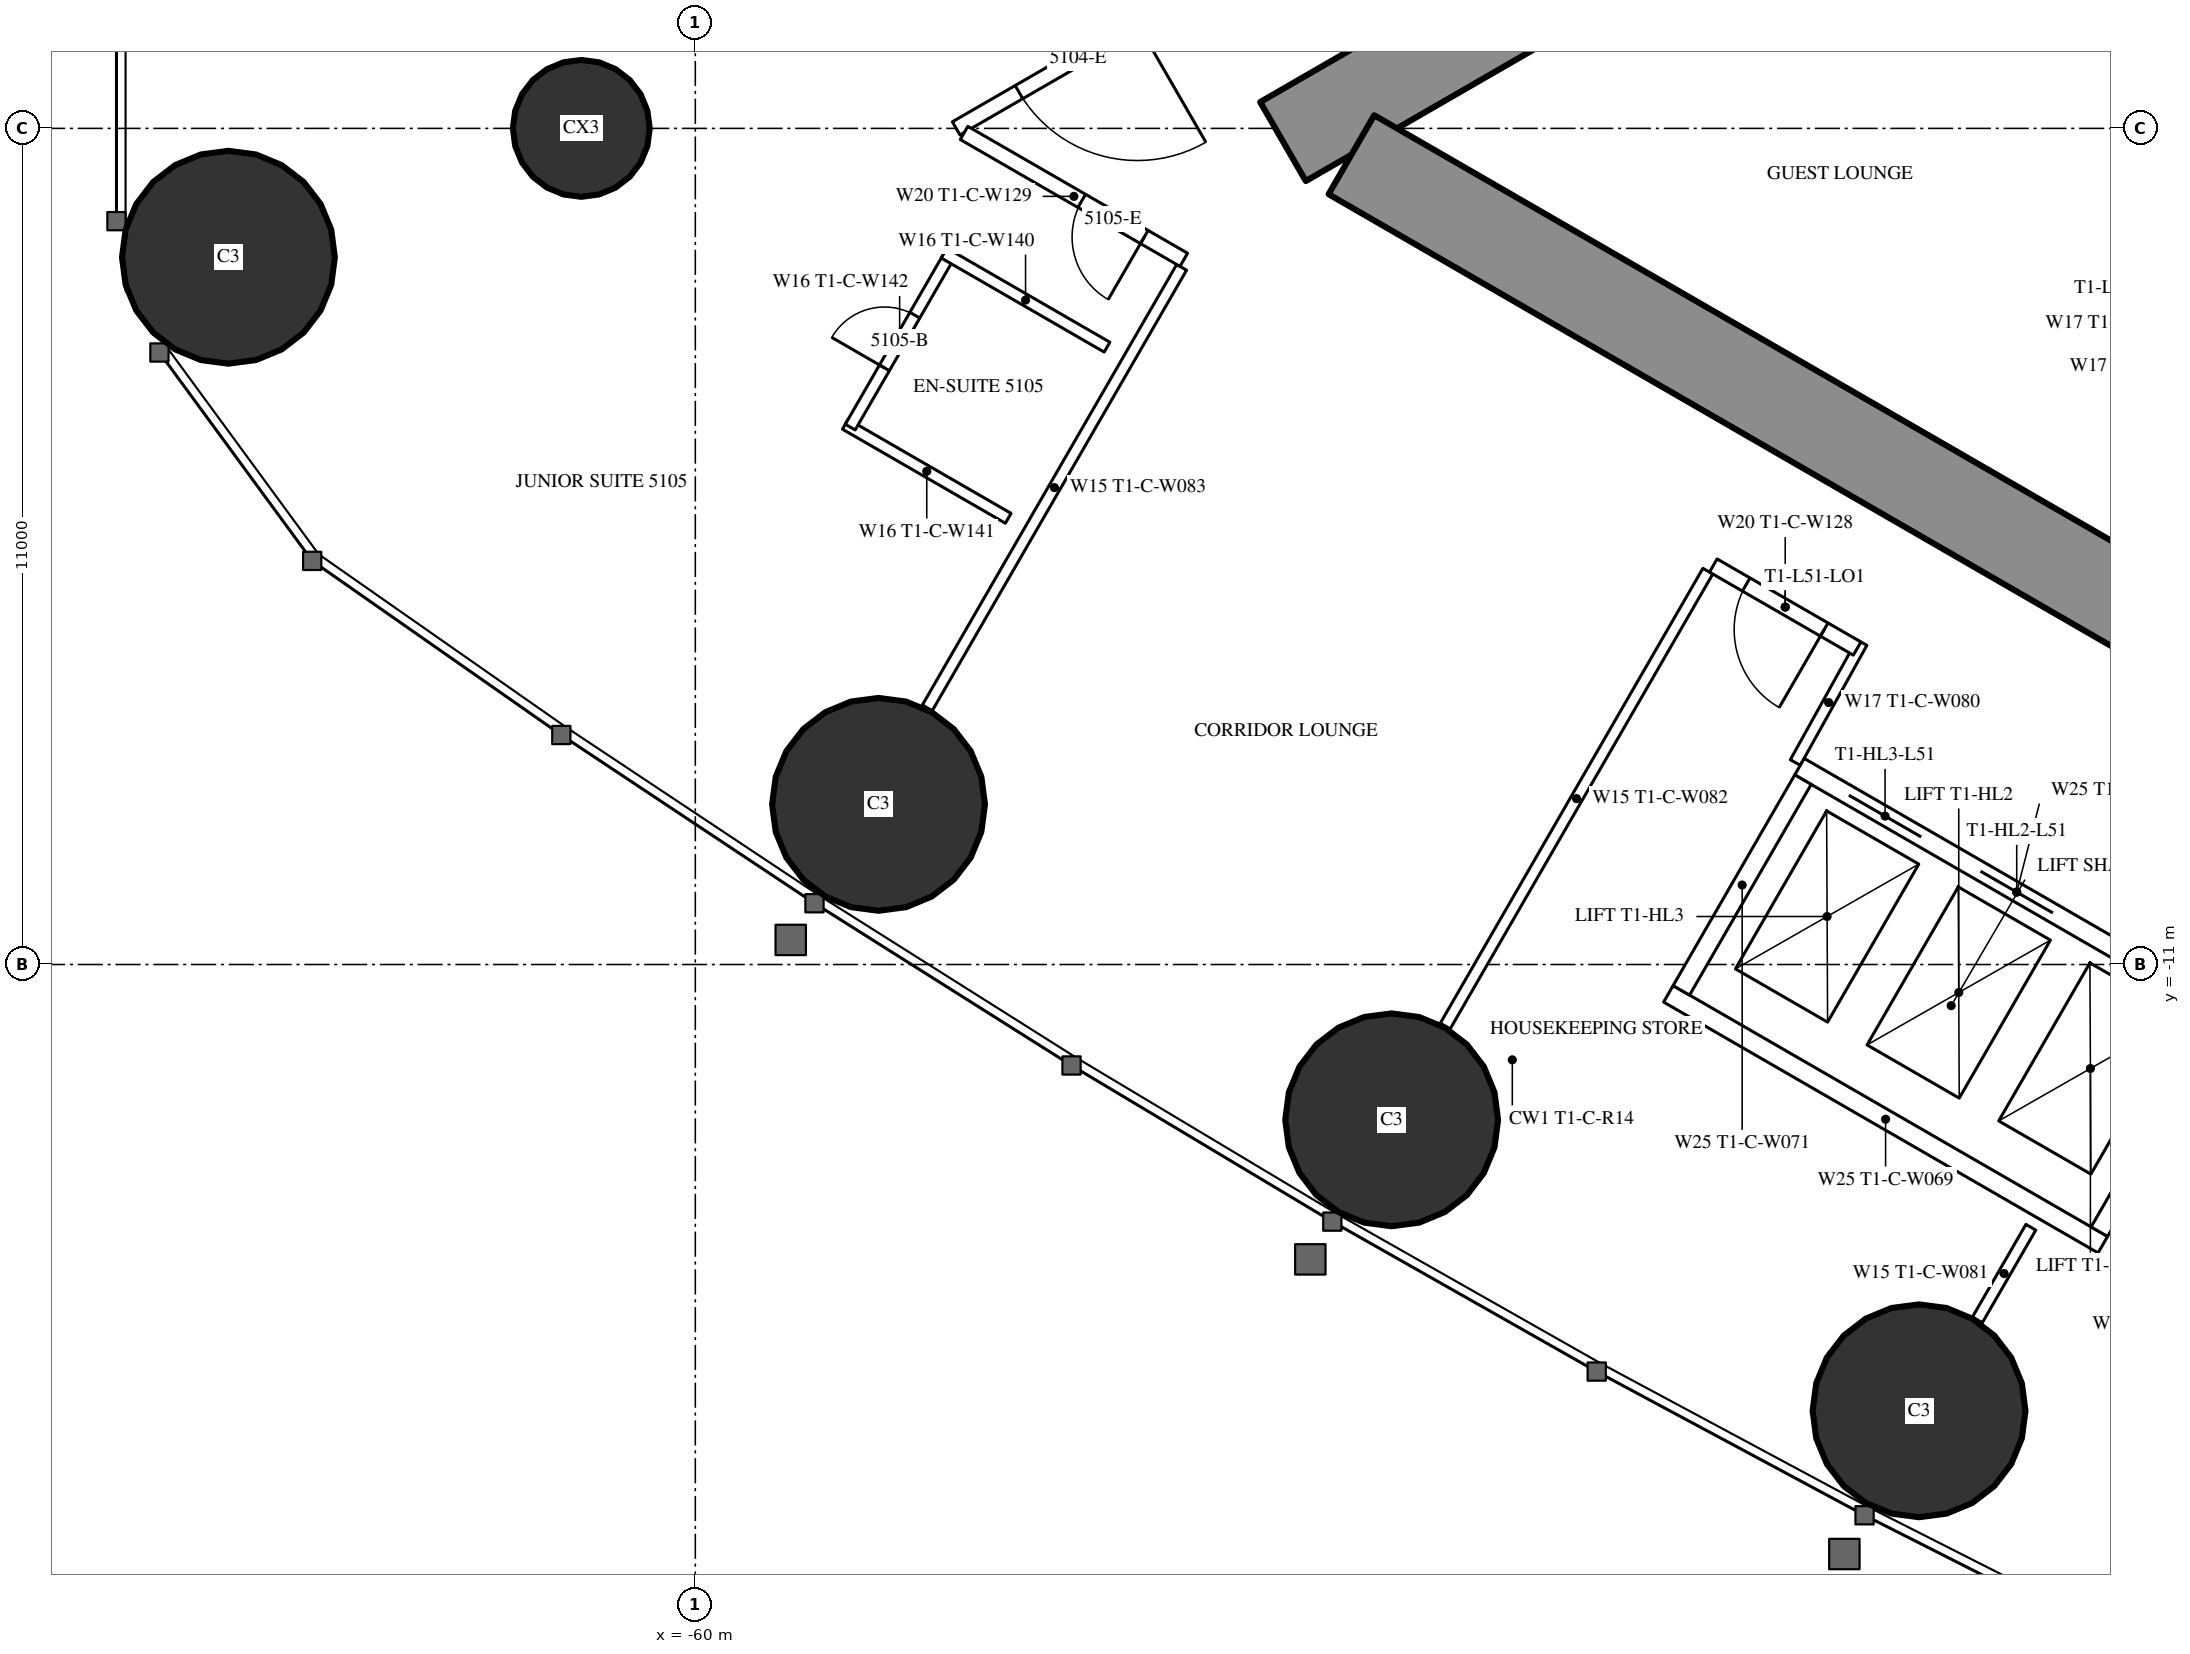
"""IFC4 building model, lengths in metres.
Left out: names, types, materials, properties, quantities, classifications, styles, units other than length and angle.
Written with IfcOpenShell. Run it as: python <this file> out.ifc"""

import sys

from ifc_helpers import new_model, si_unit, direction, frame, frame_2d, origin, origin_2d, place, context, subcontext, project, spatial, rectangle, circle, extrude, element, fill, save


model = new_model("IFC4")
c1 = context("Model", 3, precision=1e-05, world=origin(), true_north=direction((0.0, 1.0)))
c2 = subcontext(c1, "Body", "Model", "MODEL_VIEW")
j1 = project(units=[si_unit("LENGTHUNIT", "METRE"), si_unit("PLANEANGLEUNIT", "RADIAN")], contexts=[c1])
p1 = place(None, origin())
s1 = spatial("IfcSite", under=j1, at=p1, CompositionType="ELEMENT")
p2 = place(p1, origin())
s2 = spatial("IfcBuilding", under=s1, at=p2, CompositionType="ELEMENT")
p3 = place(p2, frame((0.0, 0.0, 191.3)))
s3 = spatial("IfcBuildingStorey", under=s2, at=p3, CompositionType="ELEMENT", Elevation=191.3)
for number, where, z_axis, x_axis in (
    (1, (-66.143, -1.695, 0.0), (0.0, 0.0, 1.0), (1.0, 0.0, 0.0)),
    (2, (-57.59, -8.893, 0.0), (0.0, 0.0, 1.0), (1.0, 0.0, 0.0)),
    (3, (-50.839, -13.043, 0.0), (0.0, 0.0, 1.0), (1.0, 0.0, 0.0)),
    (4, (-43.9, -16.871, 0.0), (0.0, 0.0, 1.0), (1.0, 0.0, 0.0)),
):
    element("IfcColumn", number, at=place(p3, frame(where, z_axis=z_axis, x_axis=x_axis)), inside=s3, PredefinedType="COLUMN", context=c2, shape_type="SweptSolid", body=[
        extrude(circle(Radius=1.4, at=origin_2d()), origin(), (0.0, 0.0, 1.0), 3.5),
    ])
p4 = place(p3, frame((-61.5, 0.0, 0.0), z_axis=(0.0, 0.0, 1.0), x_axis=(1.0, 0.0, 0.0)))
e5 = element("IfcColumn", 5, at=p4, inside=s3, PredefinedType="COLUMN", context=c2, shape_type="SweptSolid", body=[
    extrude(circle(Radius=0.9, at=origin_2d()), origin(), (0.0, 0.0, 1.0), 3.5),
])
p5 = place(p3, frame((-27.2, 14.3, 0.0), z_axis=(0.0, 0.0, 1.0), x_axis=(-0.866026593062, -0.499997940104, 0.0)))
e6 = element("IfcWall", 6, at=p5, inside=s3, PredefinedType="SHEAR", context=c2, shape_type="SweptSolid", body=[
    extrude(rectangle(XDim=28.946, YDim=1.2, at=frame_2d((14.473, 0.0))), origin(), (0.0, 0.0, 1.0), 3.5),
])
p6 = place(p5, frame((4.6, 0.0, 0.0)))
e7 = element("IfcOpeningElement", 7, at=p6, cuts=e6, PredefinedType="OPENING", context=c2, shape_type="SweptSolid", body=[
    extrude(rectangle(XDim=1.0, YDim=2.2, at=frame_2d((0.5, 1.1))), frame((0.0, 0.61, 0.0), z_axis=(0.0, -1.0, 0.0), x_axis=(1.0, 0.0, 0.0)), (0.0, 0.0, 1.0), 1.22),
])
p7 = place(p5, frame((13.395, 0.0, 0.0)))
e8 = element("IfcOpeningElement", 8, at=p7, cuts=e6, PredefinedType="OPENING", context=c2, shape_type="SweptSolid", body=[
    extrude(rectangle(XDim=1.8, YDim=2.2, at=frame_2d((0.9, 1.1))), frame((0.0, 0.61, 0.0), z_axis=(0.0, -1.0, 0.0), x_axis=(1.0, 0.0, 0.0)), (0.0, 0.0, 1.0), 1.22),
])
p8 = place(p3, frame((-27.2, -14.3, 0.0), z_axis=(0.0, 0.0, 1.0), x_axis=(-0.866024021859, 0.500002393557, 0.0)))
e9 = element("IfcWall", 9, at=p8, inside=s3, PredefinedType="SHEAR", context=c2, shape_type="SweptSolid", body=[
    extrude(rectangle(XDim=27.907, YDim=1.2, at=frame_2d((13.954, 0.0))), origin(), (0.0, 0.0, 1.0), 3.5),
])
p9 = place(p8, frame((4.6, 0.0, 0.0)))
e10 = element("IfcOpeningElement", 10, at=p9, cuts=e9, PredefinedType="OPENING", context=c2, shape_type="SweptSolid", body=[
    extrude(rectangle(XDim=1.0, YDim=2.2, at=frame_2d((0.5, 1.1))), frame((0.0, 0.61, 0.0), z_axis=(0.0, -1.0, 0.0), x_axis=(1.0, 0.0, 0.0)), (0.0, 0.0, 1.0), 1.22),
])
p10 = place(p8, frame((13.395, 0.0, 0.0)))
e11 = element("IfcOpeningElement", 11, at=p10, cuts=e9, PredefinedType="OPENING", context=c2, shape_type="SweptSolid", body=[
    extrude(rectangle(XDim=1.8, YDim=2.2, at=frame_2d((0.9, 1.1))), frame((0.0, 0.61, 0.0), z_axis=(0.0, -1.0, 0.0), x_axis=(1.0, 0.0, 0.0)), (0.0, 0.0, 1.0), 1.22),
])
p11 = place(p3, frame((-27.86, 16.575, 0.0), z_axis=(0.0, 0.0, 1.0), x_axis=(-0.866025533911, -0.499999774615, 0.0)))
e12 = element("IfcWall", 12, at=p11, inside=s3, PredefinedType="PARTITIONING", context=c2, shape_type="SweptSolid", body=[
    extrude(rectangle(XDim=33.149, YDim=0.2, at=frame_2d((16.575, 0.0))), origin(), (0.0, 0.0, 1.0), 3.25),
])
p12 = place(p11, frame((3.75, 0.0, 0.0)))
e13 = element("IfcOpeningElement", 13, at=p12, cuts=e12, PredefinedType="OPENING", context=c2, shape_type="SweptSolid", body=[
    extrude(rectangle(XDim=1.0, YDim=2.2, at=frame_2d((0.5, 1.1))), frame((0.0, 0.11, 0.0), z_axis=(0.0, -1.0, 0.0), x_axis=(1.0, 0.0, 0.0)), (0.0, 0.0, 1.0), 0.22),
])
p13 = place(p11, frame((16.402, 0.0, 0.0)))
e14 = element("IfcOpeningElement", 14, at=p13, cuts=e12, PredefinedType="OPENING", context=c2, shape_type="SweptSolid", body=[
    extrude(rectangle(XDim=0.95, YDim=2.2, at=frame_2d((0.475, 1.1))), frame((0.0, 0.11, 0.0), z_axis=(0.0, -1.0, 0.0), x_axis=(1.0, 0.0, 0.0)), (0.0, 0.0, 1.0), 0.22),
])
p14 = place(p11, frame((22.047, 0.0, 0.0)))
e15 = element("IfcOpeningElement", 15, at=p14, cuts=e12, PredefinedType="OPENING", context=c2, shape_type="SweptSolid", body=[
    extrude(rectangle(XDim=0.95, YDim=2.2, at=frame_2d((0.475, 1.1))), frame((0.0, 0.11, 0.0), z_axis=(0.0, -1.0, 0.0), x_axis=(1.0, 0.0, 0.0)), (0.0, 0.0, 1.0), 0.22),
])
p15 = place(p11, frame((30.396, 0.0, 0.0)))
e16 = element("IfcOpeningElement", 16, at=p15, cuts=e12, PredefinedType="OPENING", context=c2, shape_type="SweptSolid", body=[
    extrude(rectangle(XDim=1.8, YDim=2.2, at=frame_2d((0.9, 1.1))), frame((0.0, 0.11, 0.0), z_axis=(0.0, -1.0, 0.0), x_axis=(1.0, 0.0, 0.0)), (0.0, 0.0, 1.0), 0.22),
])
p16 = place(p3, frame((-46.679, -5.825, 0.0), z_axis=(0.0, 0.0, 1.0), x_axis=(-0.500006839597, -0.866021454905, 0.0)))
e17 = element("IfcWall", 17, at=p16, inside=s3, PredefinedType="PARTITIONING", context=c2, shape_type="SweptSolid", body=[
    extrude(rectangle(XDim=6.911, YDim=0.15, at=frame_2d((3.456, 0.0))), origin(), (0.0, 0.0, 1.0), 2.3),
])
p17 = place(p3, frame((-53.602, -1.828, 0.0), z_axis=(0.0, 0.0, 1.0), x_axis=(-0.49999191814, -0.866030069798, 0.0)))
e18 = element("IfcWall", 18, at=p17, inside=s3, PredefinedType="PARTITIONING", context=c2, shape_type="SweptSolid", body=[
    extrude(rectangle(XDim=6.692, YDim=0.15, at=frame_2d((3.346, 0.0))), origin(), (0.0, 0.0, 1.0), 2.3),
])
p18 = place(p3, frame((-42.429, -14.457, 0.0), z_axis=(0.0, 0.0, 1.0), x_axis=(-0.5000578829, -0.865991982497, 0.0)))
e19 = element("IfcWall", 19, at=p18, inside=s3, PredefinedType="PARTITIONING", context=c2, shape_type="SweptSolid", body=[
    extrude(rectangle(XDim=1.407, YDim=0.15, at=frame_2d((0.704, 0.0))), origin(), (0.0, 0.0, 1.0), 3.25),
])
p19 = place(p3, frame((-44.652, -6.764, 0.0), z_axis=(0.0, 0.0, 1.0), x_axis=(-0.485424724123, -0.874278466629, 0.0)))
e20 = element("IfcWall", 20, at=p19, inside=s3, PredefinedType="PARTITIONING", context=c2, shape_type="SweptSolid", body=[
    extrude(rectangle(XDim=1.805, YDim=0.15, at=frame_2d((0.903, 0.0))), origin(), (0.0, 0.0, 1.0), 3.25),
])
p20 = place(p3, frame((-44.715, -6.844, 0.0), z_axis=(0.0, 0.0, 1.0), x_axis=(-0.865999496279, 0.500044870432, 0.0)))
e21 = element("IfcWall", 21, at=p20, inside=s3, PredefinedType="PARTITIONING", context=c2, shape_type="SweptSolid", body=[
    extrude(rectangle(XDim=2.185, YDim=0.2, at=frame_2d((1.092, 0.0))), origin(), (0.0, 0.0, 1.0), 3.25),
])
p21 = place(p20, frame((0.5, 0.0, 0.0)))
e22 = element("IfcOpeningElement", 22, at=p21, cuts=e21, PredefinedType="OPENING", context=c2, shape_type="SweptSolid", body=[
    extrude(rectangle(XDim=1.185, YDim=2.2, at=frame_2d((0.593, 1.1))), frame((0.0, 0.11, 0.0), z_axis=(0.0, -1.0, 0.0), x_axis=(1.0, 0.0, 0.0)), (0.0, 0.0, 1.0), 0.22),
])
p22 = place(p3, frame((-53.574, -1.729, 0.0), z_axis=(0.0, 0.0, 1.0), x_axis=(-0.866019930389, 0.500009480079, 0.0)))
e23 = element("IfcWall", 23, at=p22, inside=s3, PredefinedType="PARTITIONING", context=c2, shape_type="SweptSolid", body=[
    extrude(rectangle(XDim=3.338, YDim=0.2, at=frame_2d((1.669, 0.0))), origin(), (0.0, 0.0, 1.0), 3.25),
])
p23 = place(p22, frame((0.6, 0.0, 0.0)))
e24 = element("IfcOpeningElement", 24, at=p23, cuts=e23, PredefinedType="OPENING", context=c2, shape_type="SweptSolid", body=[
    extrude(rectangle(XDim=0.95, YDim=2.2, at=frame_2d((0.475, 1.1))), frame((0.0, 0.11, 0.0), z_axis=(0.0, -1.0, 0.0), x_axis=(1.0, 0.0, 0.0)), (0.0, 0.0, 1.0), 0.22),
])
p24 = place(p3, frame((-55.884, -5.13, 0.0), z_axis=(0.0, 0.0, 1.0), x_axis=(-0.866006523861, 0.500032699561, 0.0)))
e25 = element("IfcWall", 25, at=p24, inside=s3, PredefinedType="PARTITIONING", context=c2, shape_type="SweptSolid", body=[
    extrude(rectangle(XDim=2.475, YDim=0.15, at=frame_2d((1.237, 0.0))), origin(), (0.0, 0.0, 1.0), 3.25),
])
p25 = place(p3, frame((-56.662, -1.678, 0.0), z_axis=(0.0, 0.0, 1.0), x_axis=(-0.500006934395, -0.866021400173, 0.0)))
e26 = element("IfcWall", 26, at=p25, inside=s3, PredefinedType="PARTITIONING", context=c2, shape_type="SweptSolid", body=[
    extrude(rectangle(XDim=2.6, YDim=0.15, at=frame_2d((1.3, 0.0))), origin(), (0.0, 0.0, 1.0), 3.25),
])
p26 = place(p25, frame((0.9, 0.0, 0.0)))
e27 = element("IfcOpeningElement", 27, at=p26, cuts=e26, PredefinedType="OPENING", context=c2, shape_type="SweptSolid", body=[
    extrude(rectangle(XDim=0.8, YDim=2.2, at=frame_2d((0.4, 1.1))), frame((0.0, 0.085, 0.0), z_axis=(0.0, -1.0, 0.0), x_axis=(1.0, 0.0, 0.0)), (0.0, 0.0, 1.0), 0.17),
])
p27 = place(p3, frame((-54.583, -2.878, 0.0), z_axis=(0.0, 0.0, 1.0), x_axis=(-0.866006523861, 0.500032699561, 0.0)))
e28 = element("IfcWall", 28, at=p27, inside=s3, PredefinedType="PARTITIONING", context=c2, shape_type="SweptSolid", body=[
    extrude(rectangle(XDim=2.475, YDim=0.15, at=frame_2d((1.237, 0.0))), origin(), (0.0, 0.0, 1.0), 3.25),
])
p28 = place(p3, frame((-39.758, -11.697, 0.0), z_axis=(0.0, 0.0, 1.0), x_axis=(-0.866024194504, 0.500002094529, 0.0)))
e29 = element("IfcWall", 29, at=p28, inside=s3, PredefinedType="PARTITIONING", context=c2, shape_type="SweptSolid", body=[
    extrude(rectangle(XDim=6.6, YDim=0.25, at=frame_2d((3.3, 0.0))), origin(), (0.0, 0.0, 1.0), 3.25),
])
p29 = place(p28, frame((0.75, 0.0, 0.0)))
e30 = element("IfcOpeningElement", 30, at=p29, cuts=e29, PredefinedType="OPENING", context=c2, shape_type="SweptSolid", body=[
    extrude(rectangle(XDim=1.1, YDim=2.2, at=frame_2d((0.55, 1.1))), frame((0.0, 0.135, 0.0), z_axis=(0.0, -1.0, 0.0), x_axis=(1.0, 0.0, 0.0)), (0.0, 0.0, 1.0), 0.27),
])
p30 = place(p28, frame((2.75, 0.0, 0.0)))
e31 = element("IfcOpeningElement", 31, at=p30, cuts=e29, PredefinedType="OPENING", context=c2, shape_type="SweptSolid", body=[
    extrude(rectangle(XDim=1.1, YDim=2.2, at=frame_2d((0.55, 1.1))), frame((0.0, 0.135, 0.0), z_axis=(0.0, -1.0, 0.0), x_axis=(1.0, 0.0, 0.0)), (0.0, 0.0, 1.0), 0.27),
])
p31 = place(p28, frame((4.75, 0.0, 0.0)))
e32 = element("IfcOpeningElement", 32, at=p31, cuts=e29, PredefinedType="OPENING", context=c2, shape_type="SweptSolid", body=[
    extrude(rectangle(XDim=1.1, YDim=2.2, at=frame_2d((0.55, 1.1))), frame((0.0, 0.135, 0.0), z_axis=(0.0, -1.0, 0.0), x_axis=(1.0, 0.0, 0.0)), (0.0, 0.0, 1.0), 0.27),
])
p32 = place(p3, frame((-41.482, -14.686, 0.0), z_axis=(0.0, 0.0, 1.0), x_axis=(-0.86603344179, 0.499986077507, 0.0)))
e33 = element("IfcWall", 33, at=p32, inside=s3, PredefinedType="PARTITIONING", context=c2, shape_type="SweptSolid", body=[
    extrude(rectangle(XDim=6.6, YDim=0.25, at=frame_2d((3.3, 0.0))), origin(), (0.0, 0.0, 1.0), 3.25),
])
for number, where, z_axis, x_axis in (
    (34, (-39.928, -11.743, 0.0), (0.0, 0.0, 1.0), (-0.5, -0.866, 0.0)),
    (35, (-45.428, -8.568, 0.0), (0.0, 0.0, 1.0), (-0.5, -0.866, 0.0)),
):
    element("IfcWall", number, at=place(p3, frame(where, z_axis=z_axis, x_axis=x_axis)), inside=s3, PredefinedType="PARTITIONING", context=c2, shape_type="SweptSolid", body=[
        extrude(rectangle(XDim=3.201, YDim=0.25, at=frame_2d((1.6, 0.0))), origin(), (0.0, 0.0, 1.0), 3.25),
    ])
p33 = place(p15, origin())
e36 = element("IfcDoor", 36, at=p33, inside=s3, OperationType="DOUBLE_DOOR_SINGLE_SWING", PredefinedType="DOOR", context=c2, shape_type="SweptSolid", body=[
    extrude(rectangle(XDim=1.8, YDim=2.2, at=frame_2d((0.9, 1.1))), frame((0.0, 0.025, 0.0), z_axis=(0.0, -1.0, 0.0), x_axis=(1.0, 0.0, 0.0)), (0.0, 0.0, 1.0), 0.05),
])
fill(e16, e36)
p34 = place(p26, origin())
e37 = element("IfcDoor", 37, at=p34, inside=s3, OperationType="SINGLE_SWING_RIGHT", PredefinedType="DOOR", context=c2, shape_type="SweptSolid", body=[
    extrude(rectangle(XDim=0.8, YDim=2.2, at=frame_2d((0.4, 1.1))), frame((0.0, 0.025, 0.0), z_axis=(0.0, -1.0, 0.0), x_axis=(1.0, 0.0, 0.0)), (0.0, 0.0, 1.0), 0.05),
])
fill(e27, e37)
p35 = place(p23, origin())
e38 = element("IfcDoor", 38, at=p35, inside=s3, OperationType="SINGLE_SWING_LEFT", PredefinedType="DOOR", context=c2, shape_type="SweptSolid", body=[
    extrude(rectangle(XDim=0.95, YDim=2.2, at=frame_2d((0.475, 1.1))), frame((0.0, 0.025, 0.0), z_axis=(0.0, -1.0, 0.0), x_axis=(1.0, 0.0, 0.0)), (0.0, 0.0, 1.0), 0.05),
])
fill(e24, e38)
p36 = place(p21, origin())
e39 = element("IfcDoor", 39, at=p36, inside=s3, OperationType="SINGLE_SWING_LEFT", PredefinedType="DOOR", context=c2, shape_type="SweptSolid", body=[
    extrude(rectangle(XDim=1.185, YDim=2.2, at=frame_2d((0.593, 1.1))), frame((0.0, 0.025, 0.0), z_axis=(0.0, -1.0, 0.0), x_axis=(1.0, 0.0, 0.0)), (0.0, 0.0, 1.0), 0.05),
])
fill(e22, e39)
p37 = place(p30, origin())
e40 = element("IfcDoor", 40, at=p37, inside=s3, OperationType="DOUBLE_DOOR_SLIDING", PredefinedType="USERDEFINED", context=c2, shape_type="SweptSolid", body=[
    extrude(rectangle(XDim=1.1, YDim=2.2, at=frame_2d((0.55, 1.1))), frame((0.0, 0.025, 0.0), z_axis=(0.0, -1.0, 0.0), x_axis=(1.0, 0.0, 0.0)), (0.0, 0.0, 1.0), 0.05),
])
fill(e31, e40)
p38 = place(p31, origin())
e41 = element("IfcDoor", 41, at=p38, inside=s3, OperationType="DOUBLE_DOOR_SLIDING", PredefinedType="USERDEFINED", context=c2, shape_type="SweptSolid", body=[
    extrude(rectangle(XDim=1.1, YDim=2.2, at=frame_2d((0.55, 1.1))), frame((0.0, 0.025, 0.0), z_axis=(0.0, -1.0, 0.0), x_axis=(1.0, 0.0, 0.0)), (0.0, 0.0, 1.0), 0.05),
])
fill(e32, e41)
save(model, sys.argv[1])
